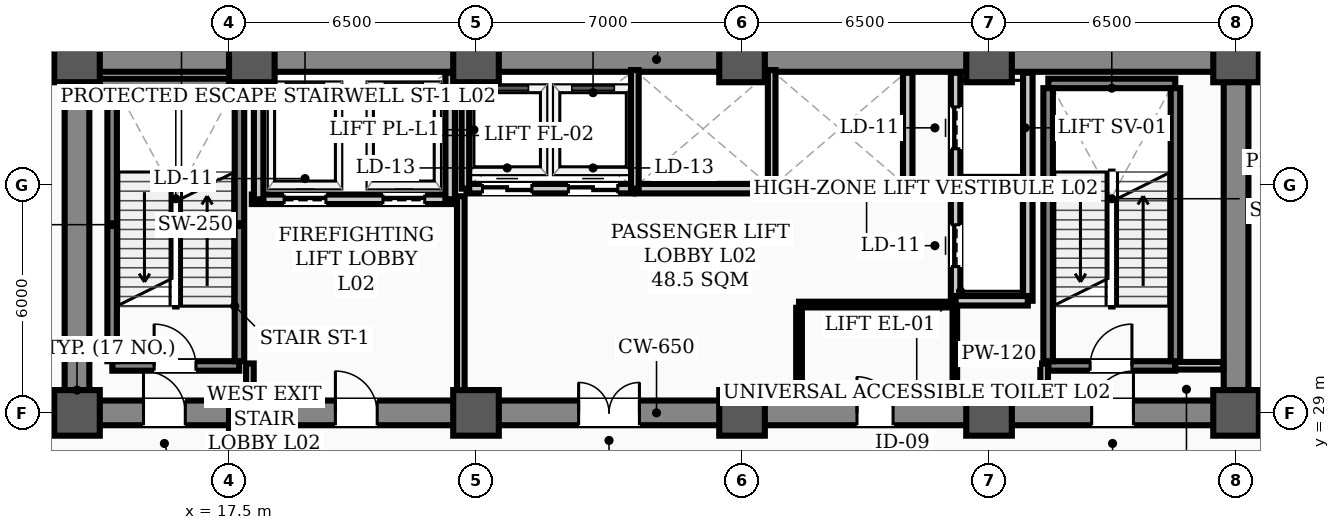
"""IFC4 building model, lengths in metres.
Left out: names, types, materials, properties, quantities, classifications, styles, units other than length and angle.
Written with IfcOpenShell. Run it as: python <this file> out.ifc"""

import sys

from ifc_helpers import new_model, si_unit, direction, frame, frame_2d, origin, origin_2d, place, context, subcontext, project, spatial, rectangle, hollow_rectangle, extrude, element, fill, save


model = new_model("IFC4")
c1 = context("Model", 3, precision=1e-05, world=origin(), true_north=direction((0.0, 1.0)))
c2 = subcontext(c1, "Body", "Model", "MODEL_VIEW")
j1 = project(units=[si_unit("LENGTHUNIT", "METRE"), si_unit("PLANEANGLEUNIT", "RADIAN")], contexts=[c1])
p1 = place(None, origin())
s1 = spatial("IfcSite", under=j1, at=p1, CompositionType="ELEMENT")
p2 = place(p1, origin())
s2 = spatial("IfcBuilding", under=s1, at=p2, CompositionType="ELEMENT")
p3 = place(p2, frame((0.0, 0.0, 5.8)))
s3 = spatial("IfcBuildingStorey", under=s2, at=p3, CompositionType="ELEMENT", Elevation=5.8)
for number, where, z_axis, x_axis in (
    (1, (13.5, 29.0, 0.0), (0.0, 0.0, 1.0), (1.0, 0.0, 0.0)),
    (2, (13.5, 38.3, 0.0), (0.0, 0.0, 1.0), (1.0, 0.0, 0.0)),
    (3, (18.1, 29.0, 0.0), (0.0, 0.0, 1.0), (1.0, 0.0, 0.0)),
    (4, (18.1, 38.3, 0.0), (0.0, 0.0, 1.0), (1.0, 0.0, 0.0)),
    (5, (24.0, 29.0, 0.0), (0.0, 0.0, 1.0), (1.0, 0.0, 0.0)),
    (6, (24.0, 38.3, 0.0), (0.0, 0.0, 1.0), (1.0, 0.0, 0.0)),
    (7, (31.0, 29.0, 0.0), (0.0, 0.0, 1.0), (1.0, 0.0, 0.0)),
    (8, (31.0, 38.3, 0.0), (0.0, 0.0, 1.0), (1.0, 0.0, 0.0)),
    (9, (37.5, 29.0, 0.0), (0.0, 0.0, 1.0), (1.0, 0.0, 0.0)),
    (10, (37.5, 38.3, 0.0), (0.0, 0.0, 1.0), (1.0, 0.0, 0.0)),
    (11, (44.0, 29.0, 0.0), (0.0, 0.0, 1.0), (1.0, 0.0, 0.0)),
    (12, (44.0, 38.3, 0.0), (0.0, 0.0, 1.0), (1.0, 0.0, 0.0)),
):
    element("IfcColumn", number, at=place(p3, frame(where, z_axis=z_axis, x_axis=x_axis)), inside=s3, PredefinedType="COLUMN", context=c2, shape_type="SweptSolid", body=[
        extrude(hollow_rectangle(XDim=1.2, YDim=1.2, WallThickness=0.04, InnerFilletRadius=0.02, OuterFilletRadius=0.06, at=origin_2d()), origin(), (0.0, 0.0, 1.0), 5.4),
    ])
p4 = place(p3, frame((13.5, 29.0, 0.0), z_axis=(0.0, 0.0, 1.0), x_axis=(1.0, 0.0, 0.0)))
e13 = element("IfcWall", 13, at=p4, inside=s3, PredefinedType="SHEAR", context=c2, shape_type="SweptSolid", body=[
    extrude(rectangle(XDim=30.5, YDim=0.65, at=frame_2d((15.25, 0.0))), origin(), (0.0, 0.0, 1.0), 5.15),
])
p5 = place(p4, frame((1.75, 0.0, 0.0)))
e14 = element("IfcOpeningElement", 14, at=p5, cuts=e13, PredefinedType="OPENING", context=c2, shape_type="SweptSolid", body=[
    extrude(rectangle(XDim=1.1, YDim=2.08, at=frame_2d((0.55, 1.04))), frame((0.0, 0.335, 0.0), z_axis=(0.0, -1.0, 0.0), x_axis=(1.0, 0.0, 0.0)), (0.0, 0.0, 1.0), 0.67),
])
p6 = place(p4, frame((26.7, 0.0, 0.0)))
e15 = element("IfcOpeningElement", 15, at=p6, cuts=e13, PredefinedType="OPENING", context=c2, shape_type="SweptSolid", body=[
    extrude(rectangle(XDim=1.1, YDim=2.08, at=frame_2d((0.55, 1.04))), frame((0.0, 0.335, 0.0), z_axis=(0.0, -1.0, 0.0), x_axis=(1.0, 0.0, 0.0)), (0.0, 0.0, 1.0), 0.67),
])
p7 = place(p4, frame((6.8, 0.0, 0.0)))
e16 = element("IfcOpeningElement", 16, at=p7, cuts=e13, PredefinedType="OPENING", context=c2, shape_type="SweptSolid", body=[
    extrude(rectangle(XDim=1.1, YDim=2.08, at=frame_2d((0.55, 1.04))), frame((0.0, 0.335, 0.0), z_axis=(0.0, -1.0, 0.0), x_axis=(1.0, 0.0, 0.0)), (0.0, 0.0, 1.0), 0.67),
])
p8 = place(p4, frame((13.2, 0.0, 0.0)))
e17 = element("IfcOpeningElement", 17, at=p8, cuts=e13, PredefinedType="OPENING", context=c2, shape_type="SweptSolid", body=[
    extrude(rectangle(XDim=1.6, YDim=2.08, at=frame_2d((0.8, 1.04))), frame((0.0, 0.335, 0.0), z_axis=(0.0, -1.0, 0.0), x_axis=(1.0, 0.0, 0.0)), (0.0, 0.0, 1.0), 0.67),
])
p9 = place(p4, frame((20.525, 0.0, 0.0)))
e18 = element("IfcOpeningElement", 18, at=p9, cuts=e13, PredefinedType="OPENING", context=c2, shape_type="SweptSolid", body=[
    extrude(rectangle(XDim=0.95, YDim=2.08, at=frame_2d((0.475, 1.04))), frame((0.0, 0.335, 0.0), z_axis=(0.0, -1.0, 0.0), x_axis=(1.0, 0.0, 0.0)), (0.0, 0.0, 1.0), 0.67),
])
p10 = place(p3, frame((13.5, 38.3, 0.0), z_axis=(0.0, 0.0, 1.0), x_axis=(1.0, 0.0, 0.0)))
e19 = element("IfcWall", 19, at=p10, inside=s3, PredefinedType="SHEAR", context=c2, shape_type="SweptSolid", body=[
    extrude(rectangle(XDim=30.5, YDim=0.65, at=frame_2d((15.25, 0.0))), origin(), (0.0, 0.0, 1.0), 5.15),
])
for number, where, z_axis, x_axis in (
    (20, (13.5, 29.35, 0.0), (0.0, 0.0, 1.0), (0.0, 1.0, 0.0)),
    (21, (44.0, 29.35, 0.0), (0.0, 0.0, 1.0), (0.0, 1.0, 0.0)),
):
    element("IfcWall", number, at=place(p3, frame(where, z_axis=z_axis, x_axis=x_axis)), inside=s3, PredefinedType="SHEAR", context=c2, shape_type="SweptSolid", body=[
        extrude(rectangle(XDim=8.6, YDim=0.65, at=frame_2d((4.3, 0.0))), origin(), (0.0, 0.0, 1.0), 5.15),
    ])
p11 = place(p3, frame((14.43, 30.235, 0.0), z_axis=(0.0, 0.0, 1.0), x_axis=(1.0, 0.0, 0.0)))
e22 = element("IfcWall", 22, at=p11, inside=s3, PredefinedType="STANDARD", context=c2, shape_type="SweptSolid", body=[
    extrude(rectangle(XDim=3.34, YDim=0.25, at=frame_2d((1.67, 0.0))), origin(), (0.0, 0.0, 1.0), 5.15),
])
p12 = place(p11, frame((1.1, 0.0, 0.0)))
e23 = element("IfcOpeningElement", 23, at=p12, cuts=e22, PredefinedType="OPENING", context=c2, shape_type="SweptSolid", body=[
    extrude(rectangle(XDim=1.1, YDim=2.08, at=frame_2d((0.55, 1.04))), frame((0.0, 0.135, 0.0), z_axis=(0.0, -1.0, 0.0), x_axis=(1.0, 0.0, 0.0)), (0.0, 0.0, 1.0), 0.27),
])
p13 = place(p3, frame((14.1, 37.669, 0.0), z_axis=(0.0, 0.0, 1.0), x_axis=(1.0, 0.0, 0.0)))
e24 = element("IfcWall", 24, at=p13, inside=s3, PredefinedType="STANDARD", context=c2, shape_type="SweptSolid", body=[
    extrude(rectangle(XDim=3.67, YDim=0.25, at=frame_2d((1.835, 0.0))), origin(), (0.0, 0.0, 1.0), 5.15),
])
for number, where, z_axis, x_axis in (
    (25, (14.425, 30.36, 0.0), (0.0, 0.0, 1.0), (0.0, 1.0, 0.0)),
    (26, (17.775, 30.36, 0.0), (0.0, 0.0, 1.0), (0.0, 1.0, 0.0)),
):
    element("IfcWall", number, at=place(p3, frame(where, z_axis=z_axis, x_axis=x_axis)), inside=s3, PredefinedType="STANDARD", context=c2, shape_type="SweptSolid", body=[
        extrude(rectangle(XDim=7.184, YDim=0.25, at=frame_2d((3.592, 0.0))), origin(), (0.0, 0.0, 1.0), 5.15),
    ])
p14 = place(p3, frame((39.06, 30.235, 0.0), z_axis=(0.0, 0.0, 1.0), x_axis=(1.0, 0.0, 0.0)))
e27 = element("IfcWall", 27, at=p14, inside=s3, PredefinedType="STANDARD", context=c2, shape_type="SweptSolid", body=[
    extrude(rectangle(XDim=3.34, YDim=0.25, at=frame_2d((1.67, 0.0))), origin(), (0.0, 0.0, 1.0), 5.15),
])
p15 = place(p14, frame((1.1, 0.0, 0.0)))
e28 = element("IfcOpeningElement", 28, at=p15, cuts=e27, PredefinedType="OPENING", context=c2, shape_type="SweptSolid", body=[
    extrude(rectangle(XDim=1.1, YDim=2.08, at=frame_2d((0.55, 1.04))), frame((0.0, 0.135, 0.0), z_axis=(0.0, -1.0, 0.0), x_axis=(1.0, 0.0, 0.0)), (0.0, 0.0, 1.0), 0.27),
])
p16 = place(p3, frame((39.06, 37.669, 0.0), z_axis=(0.0, 0.0, 1.0), x_axis=(1.0, 0.0, 0.0)))
e29 = element("IfcWall", 29, at=p16, inside=s3, PredefinedType="STANDARD", context=c2, shape_type="SweptSolid", body=[
    extrude(rectangle(XDim=3.34, YDim=0.25, at=frame_2d((1.67, 0.0))), origin(), (0.0, 0.0, 1.0), 5.15),
])
for number, where, z_axis, x_axis in (
    (30, (39.055, 30.36, 0.0), (0.0, 0.0, 1.0), (0.0, 1.0, 0.0)),
    (31, (42.405, 30.36, 0.0), (0.0, 0.0, 1.0), (0.0, 1.0, 0.0)),
):
    element("IfcWall", number, at=place(p3, frame(where, z_axis=z_axis, x_axis=x_axis)), inside=s3, PredefinedType="STANDARD", context=c2, shape_type="SweptSolid", body=[
        extrude(rectangle(XDim=7.184, YDim=0.25, at=frame_2d((3.592, 0.0))), origin(), (0.0, 0.0, 1.0), 5.15),
    ])
p17 = place(p3, frame((18.1, 34.62, 0.0), z_axis=(0.0, 0.0, 1.0), x_axis=(1.0, 0.0, 0.0)))
e32 = element("IfcWall", 32, at=p17, inside=s3, PredefinedType="STANDARD", context=c2, shape_type="SweptSolid", body=[
    extrude(rectangle(XDim=5.35, YDim=0.25, at=frame_2d((2.675, 0.0))), origin(), (0.0, 0.0, 1.0), 5.15),
])
p18 = place(p17, frame((0.85, 0.0, 0.0)))
e33 = element("IfcOpeningElement", 33, at=p18, cuts=e32, PredefinedType="OPENING", context=c2, shape_type="SweptSolid", body=[
    extrude(rectangle(XDim=1.1, YDim=2.08, at=frame_2d((0.55, 1.04))), frame((0.0, 0.135, 0.0), z_axis=(0.0, -1.0, 0.0), x_axis=(1.0, 0.0, 0.0)), (0.0, 0.0, 1.0), 0.27),
])
p19 = place(p17, frame((3.45, 0.0, 0.0)))
e34 = element("IfcOpeningElement", 34, at=p19, cuts=e32, PredefinedType="OPENING", context=c2, shape_type="SweptSolid", body=[
    extrude(rectangle(XDim=1.1, YDim=2.08, at=frame_2d((0.55, 1.04))), frame((0.0, 0.135, 0.0), z_axis=(0.0, -1.0, 0.0), x_axis=(1.0, 0.0, 0.0)), (0.0, 0.0, 1.0), 0.27),
])
p20 = place(p3, frame((36.62, 31.95, 0.0), z_axis=(0.0, 0.0, 1.0), x_axis=(0.0, 1.0, 0.0)))
e35 = element("IfcWall", 35, at=p20, inside=s3, PredefinedType="STANDARD", context=c2, shape_type="SweptSolid", body=[
    extrude(rectangle(XDim=6.0, YDim=0.25, at=frame_2d((3.0, 0.0))), origin(), (0.0, 0.0, 1.0), 4.33),
])
p21 = place(p20, frame((0.9, 0.0, 0.0)))
e36 = element("IfcOpeningElement", 36, at=p21, cuts=e35, PredefinedType="OPENING", context=c2, shape_type="SweptSolid", body=[
    extrude(rectangle(XDim=1.1, YDim=2.08, at=frame_2d((0.55, 1.04))), frame((0.0, 0.135, 0.0), z_axis=(0.0, -1.0, 0.0), x_axis=(1.0, 0.0, 0.0)), (0.0, 0.0, 1.0), 0.27),
])
p22 = place(p20, frame((4.0, 0.0, 0.0)))
e37 = element("IfcOpeningElement", 37, at=p22, cuts=e35, PredefinedType="OPENING", context=c2, shape_type="SweptSolid", body=[
    extrude(rectangle(XDim=1.1, YDim=2.08, at=frame_2d((0.55, 1.04))), frame((0.0, 0.135, 0.0), z_axis=(0.0, -1.0, 0.0), x_axis=(1.0, 0.0, 0.0)), (0.0, 0.0, 1.0), 0.27),
])
p23 = place(p3, frame((38.52, 31.95, 0.0), z_axis=(0.0, 0.0, 1.0), x_axis=(0.0, 1.0, 0.0)))
e38 = element("IfcWall", 38, at=p23, inside=s3, PredefinedType="STANDARD", context=c2, shape_type="SweptSolid", body=[
    extrude(rectangle(XDim=6.0, YDim=0.25, at=frame_2d((3.0, 0.0))), origin(), (0.0, 0.0, 1.0), 4.33),
])
p24 = place(p3, frame((36.62, 31.95, 0.0), z_axis=(0.0, 0.0, 1.0), x_axis=(1.0, 0.0, 0.0)))
e39 = element("IfcWall", 39, at=p24, inside=s3, PredefinedType="STANDARD", context=c2, shape_type="SweptSolid", body=[
    extrude(rectangle(XDim=1.9, YDim=0.25, at=frame_2d((0.95, 0.0))), origin(), (0.0, 0.0, 1.0), 4.98),
])
for number, where, z_axis, x_axis in (
    (40, (18.28, 34.62, 0.0), (0.0, 0.0, 1.0), (0.0, 1.0, 0.0)),
    (41, (23.32, 34.62, 0.0), (0.0, 0.0, 1.0), (0.0, 1.0, 0.0)),
):
    element("IfcWall", number, at=place(p3, frame(where, z_axis=z_axis, x_axis=x_axis)), inside=s3, PredefinedType="STANDARD", context=c2, shape_type="SweptSolid", body=[
        extrude(rectangle(XDim=3.33, YDim=0.25, at=frame_2d((1.665, 0.0))), origin(), (0.0, 0.0, 1.0), 4.33),
    ])
p25 = place(p3, frame((35.36, 34.9, 0.0), z_axis=(0.0, 0.0, 1.0), x_axis=(0.0, 1.0, 0.0)))
e42 = element("IfcWall", 42, at=p25, inside=s3, PredefinedType="STANDARD", context=c2, shape_type="SweptSolid", body=[
    extrude(rectangle(XDim=3.05, YDim=0.25, at=frame_2d((1.525, 0.0))), origin(), (0.0, 0.0, 1.0), 4.33),
])
p26 = place(p3, frame((23.75, 34.9, 0.0), z_axis=(0.0, 0.0, 1.0), x_axis=(1.0, 0.0, 0.0)))
e43 = element("IfcWall", 43, at=p26, inside=s3, PredefinedType="STANDARD", context=c2, shape_type="SweptSolid", body=[
    extrude(rectangle(XDim=4.4, YDim=0.25, at=frame_2d((2.2, 0.0))), origin(), (0.0, 0.0, 1.0), 5.15),
])
p27 = place(p26, frame((0.42, 0.0, 0.0)))
e44 = element("IfcOpeningElement", 44, at=p27, cuts=e43, PredefinedType="OPENING", context=c2, shape_type="SweptSolid", body=[
    extrude(rectangle(XDim=1.3, YDim=2.08, at=frame_2d((0.65, 1.04))), frame((0.0, 0.135, 0.0), z_axis=(0.0, -1.0, 0.0), x_axis=(1.0, 0.0, 0.0)), (0.0, 0.0, 1.0), 0.27),
])
p28 = place(p26, frame((2.68, 0.0, 0.0)))
e45 = element("IfcOpeningElement", 45, at=p28, cuts=e43, PredefinedType="OPENING", context=c2, shape_type="SweptSolid", body=[
    extrude(rectangle(XDim=1.3, YDim=2.08, at=frame_2d((0.65, 1.04))), frame((0.0, 0.135, 0.0), z_axis=(0.0, -1.0, 0.0), x_axis=(1.0, 0.0, 0.0)), (0.0, 0.0, 1.0), 0.27),
])
p29 = place(p3, frame((28.2, 34.9, 0.0), z_axis=(0.0, 0.0, 1.0), x_axis=(1.0, 0.0, 0.0)))
e46 = element("IfcWall", 46, at=p29, inside=s3, PredefinedType="STANDARD", context=c2, shape_type="SweptSolid", body=[
    extrude(rectangle(XDim=3.55, YDim=0.25, at=frame_2d((1.775, 0.0))), origin(), (0.0, 0.0, 1.0), 5.15),
])
p30 = place(p3, frame((31.8, 34.9, 0.0), z_axis=(0.0, 0.0, 1.0), x_axis=(1.0, 0.0, 0.0)))
e47 = element("IfcWall", 47, at=p30, inside=s3, PredefinedType="STANDARD", context=c2, shape_type="SweptSolid", body=[
    extrude(rectangle(XDim=3.6, YDim=0.25, at=frame_2d((1.8, 0.0))), origin(), (0.0, 0.0, 1.0), 5.15),
])
p31 = place(p3, frame((42.4, 30.24, 0.0), z_axis=(0.0, 0.0, 1.0), x_axis=(1.0, 0.0, 0.0)))
e48 = element("IfcWall", 48, at=p31, inside=s3, PredefinedType="STANDARD", context=c2, shape_type="SweptSolid", body=[
    extrude(rectangle(XDim=1.265, YDim=0.2, at=frame_2d((0.633, 0.0))), origin(), (0.0, 0.0, 1.0), 4.43),
])
p32 = place(p3, frame((32.5, 31.85, 0.0), z_axis=(0.0, 0.0, 1.0), x_axis=(1.0, 0.0, 0.0)))
e49 = element("IfcWall", 49, at=p32, inside=s3, PredefinedType="PARTITIONING", context=c2, shape_type="SweptSolid", body=[
    extrude(rectangle(XDim=4.1, YDim=0.15, at=frame_2d((2.05, 0.0))), origin(), (0.0, 0.0, 1.0), 5.15),
])
for number, where, z_axis, x_axis in (
    (50, (18.05, 29.335, 0.0), (0.0, 0.0, 1.0), (0.0, 1.0, 0.0)),
    (51, (38.95, 29.335, 0.0), (0.0, 0.0, 1.0), (0.0, 1.0, 0.0)),
):
    element("IfcWall", number, at=place(p3, frame(where, z_axis=z_axis, x_axis=x_axis)), inside=s3, PredefinedType="STANDARD", context=c2, shape_type="SweptSolid", body=[
        extrude(rectangle(XDim=0.965, YDim=0.2, at=frame_2d((0.482, 0.0))), origin(), (0.0, 0.0, 1.0), 4.33),
    ])
p33 = place(p3, frame((23.6, 29.335, 0.0), z_axis=(0.0, 0.0, 1.0), x_axis=(0.0, 1.0, 0.0)))
e52 = element("IfcWall", 52, at=p33, inside=s3, PredefinedType="STANDARD", context=c2, shape_type="SweptSolid", body=[
    extrude(rectangle(XDim=5.365, YDim=0.2, at=frame_2d((2.683, 0.0))), origin(), (0.0, 0.0, 1.0), 4.33),
])
p34 = place(p3, frame((32.5, 29.335, 0.0), z_axis=(0.0, 0.0, 1.0), x_axis=(0.0, 1.0, 0.0)))
e53 = element("IfcWall", 53, at=p34, inside=s3, PredefinedType="PARTITIONING", context=c2, shape_type="SweptSolid", body=[
    extrude(rectangle(XDim=2.43, YDim=0.15, at=frame_2d((1.215, 0.0))), origin(), (0.0, 0.0, 1.0), 4.33),
])
p35 = place(p3, frame((36.6, 29.335, 0.0), z_axis=(0.0, 0.0, 1.0), x_axis=(0.0, 1.0, 0.0)))
e54 = element("IfcWall", 54, at=p35, inside=s3, PredefinedType="PARTITIONING", context=c2, shape_type="SweptSolid", body=[
    extrude(rectangle(XDim=2.43, YDim=0.12, at=frame_2d((1.215, 0.0))), origin(), (0.0, 0.0, 1.0), 4.33),
])
for number, where, z_axis, x_axis in (
    (55, (23.72, 34.9, 0.0), (0.0, 0.0, 1.0), (0.0, 1.0, 0.0)),
    (56, (28.18, 34.9, 0.0), (0.0, 0.0, 1.0), (0.0, 1.0, 0.0)),
    (57, (31.78, 34.9, 0.0), (0.0, 0.0, 1.0), (0.0, 1.0, 0.0)),
):
    element("IfcWall", number, at=place(p3, frame(where, z_axis=z_axis, x_axis=x_axis)), inside=s3, PredefinedType="STANDARD", context=c2, shape_type="SweptSolid", body=[
        extrude(rectangle(XDim=3.12, YDim=0.2, at=frame_2d((1.56, 0.0))), origin(), (0.0, 0.0, 1.0), 4.33),
    ])
p36 = place(p12, origin())
e58 = element("IfcDoor", 58, at=p36, inside=s3, OperationType="SINGLE_SWING_LEFT", PredefinedType="DOOR", context=c2, shape_type="SweptSolid", body=[
    extrude(rectangle(XDim=1.1, YDim=2.08, at=frame_2d((0.55, 1.04))), frame((0.0, 0.025, 0.0), z_axis=(0.0, -1.0, 0.0), x_axis=(1.0, 0.0, 0.0)), (0.0, 0.0, 1.0), 0.05),
])
fill(e23, e58)
p37 = place(p15, origin())
e59 = element("IfcDoor", 59, at=p37, inside=s3, OperationType="SINGLE_SWING_RIGHT", PredefinedType="DOOR", context=c2, shape_type="SweptSolid", body=[
    extrude(rectangle(XDim=1.1, YDim=2.08, at=frame_2d((0.55, 1.04))), frame((0.0, 0.025, 0.0), z_axis=(0.0, -1.0, 0.0), x_axis=(1.0, 0.0, 0.0)), (0.0, 0.0, 1.0), 0.05),
])
fill(e28, e59)
p38 = place(p5, origin())
e60 = element("IfcDoor", 60, at=p38, inside=s3, OperationType="SINGLE_SWING_LEFT", PredefinedType="DOOR", context=c2, shape_type="SweptSolid", body=[
    extrude(rectangle(XDim=1.1, YDim=2.08, at=frame_2d((0.55, 1.04))), frame((0.0, 0.025, 0.0), z_axis=(0.0, -1.0, 0.0), x_axis=(1.0, 0.0, 0.0)), (0.0, 0.0, 1.0), 0.05),
])
fill(e14, e60)
p39 = place(p6, origin())
e61 = element("IfcDoor", 61, at=p39, inside=s3, OperationType="SINGLE_SWING_RIGHT", PredefinedType="DOOR", context=c2, shape_type="SweptSolid", body=[
    extrude(rectangle(XDim=1.1, YDim=2.08, at=frame_2d((0.55, 1.04))), frame((0.0, 0.025, 0.0), z_axis=(0.0, -1.0, 0.0), x_axis=(1.0, 0.0, 0.0)), (0.0, 0.0, 1.0), 0.05),
])
fill(e15, e61)
p40 = place(p7, origin())
e62 = element("IfcDoor", 62, at=p40, inside=s3, OperationType="SINGLE_SWING_LEFT", PredefinedType="DOOR", context=c2, shape_type="SweptSolid", body=[
    extrude(rectangle(XDim=1.1, YDim=2.08, at=frame_2d((0.55, 1.04))), frame((0.0, 0.025, 0.0), z_axis=(0.0, -1.0, 0.0), x_axis=(1.0, 0.0, 0.0)), (0.0, 0.0, 1.0), 0.05),
])
fill(e16, e62)
p41 = place(p8, origin())
e63 = element("IfcDoor", 63, at=p41, inside=s3, OperationType="DOUBLE_DOOR_SINGLE_SWING", PredefinedType="DOOR", context=c2, shape_type="SweptSolid", body=[
    extrude(rectangle(XDim=1.6, YDim=2.08, at=frame_2d((0.8, 1.04))), frame((0.0, 0.025, 0.0), z_axis=(0.0, -1.0, 0.0), x_axis=(1.0, 0.0, 0.0)), (0.0, 0.0, 1.0), 0.05),
])
fill(e17, e63)
p42 = place(p9, origin())
e64 = element("IfcDoor", 64, at=p42, inside=s3, OperationType="SINGLE_SWING_LEFT", PredefinedType="DOOR", context=c2, shape_type="SweptSolid", body=[
    extrude(rectangle(XDim=0.95, YDim=2.08, at=frame_2d((0.475, 1.04))), frame((0.0, 0.025, 0.0), z_axis=(0.0, -1.0, 0.0), x_axis=(1.0, 0.0, 0.0)), (0.0, 0.0, 1.0), 0.05),
])
fill(e18, e64)
p43 = place(p18, origin())
e65 = element("IfcDoor", 65, at=p43, inside=s3, OperationType="SLIDING_TO_LEFT", PredefinedType="DOOR", context=c2, shape_type="SweptSolid", body=[
    extrude(rectangle(XDim=1.1, YDim=2.08, at=frame_2d((0.55, 1.04))), frame((0.0, 0.025, 0.0), z_axis=(0.0, -1.0, 0.0), x_axis=(1.0, 0.0, 0.0)), (0.0, 0.0, 1.0), 0.05),
])
fill(e33, e65)
p44 = place(p19, origin())
e66 = element("IfcDoor", 66, at=p44, inside=s3, OperationType="SLIDING_TO_LEFT", PredefinedType="DOOR", context=c2, shape_type="SweptSolid", body=[
    extrude(rectangle(XDim=1.1, YDim=2.08, at=frame_2d((0.55, 1.04))), frame((0.0, 0.025, 0.0), z_axis=(0.0, -1.0, 0.0), x_axis=(1.0, 0.0, 0.0)), (0.0, 0.0, 1.0), 0.05),
])
fill(e34, e66)
p45 = place(p21, origin())
e67 = element("IfcDoor", 67, at=p45, inside=s3, OperationType="SLIDING_TO_LEFT", PredefinedType="DOOR", context=c2, shape_type="SweptSolid", body=[
    extrude(rectangle(XDim=1.1, YDim=2.08, at=frame_2d((0.55, 1.04))), frame((0.0, 0.025, 0.0), z_axis=(0.0, -1.0, 0.0), x_axis=(1.0, 0.0, 0.0)), (0.0, 0.0, 1.0), 0.05),
])
fill(e36, e67)
p46 = place(p22, origin())
e68 = element("IfcDoor", 68, at=p46, inside=s3, OperationType="SLIDING_TO_LEFT", PredefinedType="DOOR", context=c2, shape_type="SweptSolid", body=[
    extrude(rectangle(XDim=1.1, YDim=2.08, at=frame_2d((0.55, 1.04))), frame((0.0, 0.025, 0.0), z_axis=(0.0, -1.0, 0.0), x_axis=(1.0, 0.0, 0.0)), (0.0, 0.0, 1.0), 0.05),
])
fill(e37, e68)
p47 = place(p27, origin())
e69 = element("IfcDoor", 69, at=p47, inside=s3, OperationType="DOUBLE_DOOR_SLIDING", PredefinedType="DOOR", context=c2, shape_type="SweptSolid", body=[
    extrude(rectangle(XDim=1.3, YDim=2.08, at=frame_2d((0.65, 1.04))), frame((0.0, 0.025, 0.0), z_axis=(0.0, -1.0, 0.0), x_axis=(1.0, 0.0, 0.0)), (0.0, 0.0, 1.0), 0.05),
])
fill(e44, e69)
p48 = place(p28, origin())
e70 = element("IfcDoor", 70, at=p48, inside=s3, OperationType="DOUBLE_DOOR_SLIDING", PredefinedType="DOOR", context=c2, shape_type="SweptSolid", body=[
    extrude(rectangle(XDim=1.3, YDim=2.08, at=frame_2d((0.65, 1.04))), frame((0.0, 0.025, 0.0), z_axis=(0.0, -1.0, 0.0), x_axis=(1.0, 0.0, 0.0)), (0.0, 0.0, 1.0), 0.05),
])
fill(e45, e70)
save(model, sys.argv[1])
